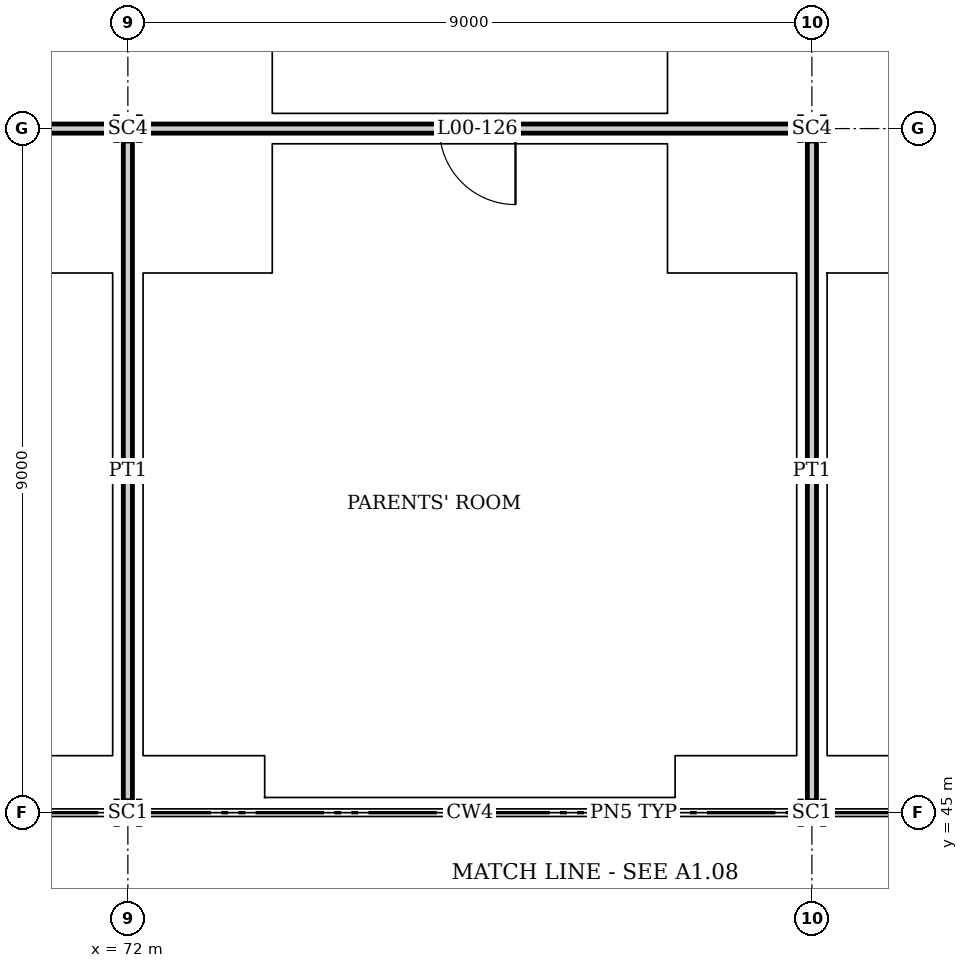
"""IFC4 building model, lengths in metres.
Left out: names, types, materials, properties, quantities, classifications, styles, units other than length and angle.
Written with IfcOpenShell. Run it as: python <this file> out.ifc"""

import sys

from ifc_helpers import new_model, si_unit, direction, frame, frame_2d, origin, origin_2d, place, context, subcontext, project, spatial, rectangle, i_section, extrude, element, fill, save


model = new_model("IFC4")
c1 = context("Model", 3, precision=1e-05, world=origin(), true_north=direction((0.0, 1.0)))
c2 = subcontext(c1, "Body", "Model", "MODEL_VIEW")
j1 = project(units=[si_unit("LENGTHUNIT", "METRE"), si_unit("PLANEANGLEUNIT", "RADIAN")], contexts=[c1])
p1 = place(None, origin())
s1 = spatial("IfcSite", under=j1, at=p1, CompositionType="ELEMENT")
p2 = place(p1, origin())
s2 = spatial("IfcBuilding", under=s1, at=p2, CompositionType="ELEMENT")
p3 = place(p2, origin())
s3 = spatial("IfcBuildingStorey", under=s2, at=p3, CompositionType="ELEMENT", Elevation=0.0)
p4 = place(p3, frame((72.0, 45.0, 0.0), z_axis=(0.0, 0.0, 1.0), x_axis=(0.0, 1.0, 0.0)))
e1 = element("IfcColumn", 1, at=p4, inside=s3, PredefinedType="COLUMN", context=c2, shape_type="SweptSolid", body=[
    extrude(i_section(OverallWidth=0.307, OverallDepth=0.315, WebThickness=0.012, FlangeThickness=0.019, at=origin_2d()), origin(), (0.0, 0.0, 1.0), 6.0),
])
p5 = place(p3, frame((72.0, 54.0, 0.0), z_axis=(0.0, 0.0, 1.0), x_axis=(0.0, 1.0, 0.0)))
e2 = element("IfcColumn", 2, at=p5, inside=s3, PredefinedType="COLUMN", context=c2, shape_type="SweptSolid", body=[
    extrude(i_section(OverallWidth=0.311, OverallDepth=0.327, WebThickness=0.016, FlangeThickness=0.025, at=origin_2d()), origin(), (0.0, 0.0, 1.0), 6.0),
])
p6 = place(p3, frame((81.0, 45.0, 0.0), z_axis=(0.0, 0.0, 1.0), x_axis=(0.0, 1.0, 0.0)))
e3 = element("IfcColumn", 3, at=p6, inside=s3, PredefinedType="COLUMN", context=c2, shape_type="SweptSolid", body=[
    extrude(i_section(OverallWidth=0.307, OverallDepth=0.315, WebThickness=0.012, FlangeThickness=0.019, at=origin_2d()), origin(), (0.0, 0.0, 1.0), 6.0),
])
p7 = place(p3, frame((81.0, 54.0, 0.0), z_axis=(0.0, 0.0, 1.0), x_axis=(0.0, 1.0, 0.0)))
e4 = element("IfcColumn", 4, at=p7, inside=s3, PredefinedType="COLUMN", context=c2, shape_type="SweptSolid", body=[
    extrude(i_section(OverallWidth=0.311, OverallDepth=0.327, WebThickness=0.016, FlangeThickness=0.025, at=origin_2d()), origin(), (0.0, 0.0, 1.0), 6.0),
])
p8 = place(p3, frame((63.0, 54.0, 0.0), z_axis=(0.0, 0.0, 1.0), x_axis=(1.0, 0.0, 0.0)))
e5 = element("IfcWall", 5, at=p8, inside=s3, PredefinedType="PARTITIONING", context=c2, shape_type="SweptSolid", body=[
    extrude(rectangle(XDim=8.836, YDim=0.12, at=frame_2d((4.418, 0.0))), origin(), (0.0, 0.0, 1.0), 5.322),
])
p9 = place(p8, frame((4.1, 0.0, 0.0)))
e6 = element("IfcOpeningElement", 6, at=p9, cuts=e5, PredefinedType="OPENING", context=c2, shape_type="SweptSolid", body=[
    extrude(rectangle(XDim=1.0, YDim=2.1, at=frame_2d((0.5, 1.05))), frame((0.0, 0.07, 0.0), z_axis=(0.0, -1.0, 0.0), x_axis=(1.0, 0.0, 0.0)), (0.0, 0.0, 1.0), 0.14),
])
p10 = place(p3, frame((72.164, 54.0, 0.0), z_axis=(0.0, 0.0, 1.0), x_axis=(1.0, 0.0, 0.0)))
e7 = element("IfcWall", 7, at=p10, inside=s3, PredefinedType="PARTITIONING", context=c2, shape_type="SweptSolid", body=[
    extrude(rectangle(XDim=8.673, YDim=0.12, at=frame_2d((4.336, 0.0))), origin(), (0.0, 0.0, 1.0), 5.322),
])
p11 = place(p10, frame((3.937, 0.0, 0.0)))
e8 = element("IfcOpeningElement", 8, at=p11, cuts=e7, PredefinedType="OPENING", context=c2, shape_type="SweptSolid", body=[
    extrude(rectangle(XDim=1.0, YDim=2.1, at=frame_2d((0.5, 1.05))), frame((0.0, 0.07, 0.0), z_axis=(0.0, -1.0, 0.0), x_axis=(1.0, 0.0, 0.0)), (0.0, 0.0, 1.0), 0.14),
])
for number, where, z_axis, x_axis in (
    (9, (72.0, 45.157, 0.0), (0.0, 0.0, 1.0), (0.0, 1.0, 0.0)),
    (10, (81.0, 45.157, 0.0), (0.0, 0.0, 1.0), (0.0, 1.0, 0.0)),
):
    element("IfcWall", number, at=place(p3, frame(where, z_axis=z_axis, x_axis=x_axis)), inside=s3, PredefinedType="PARTITIONING", context=c2, shape_type="SweptSolid", body=[
        extrude(rectangle(XDim=8.679, YDim=0.12, at=frame_2d((4.339, 0.0))), origin(), (0.0, 0.0, 1.0), 5.447),
    ])
p12 = place(p11, frame((1.0, 0.0, 0.0), z_axis=(0.0, 0.0, 1.0), x_axis=(-1.0, 0.0, 0.0)))
e11 = element("IfcDoor", 11, at=p12, inside=s3, OperationType="SINGLE_SWING_LEFT", PredefinedType="DOOR", context=c2, shape_type="SweptSolid", body=[
    extrude(rectangle(XDim=1.0, YDim=2.1, at=frame_2d((0.5, 1.05))), frame((0.0, 0.025, 0.0), z_axis=(0.0, -1.0, 0.0), x_axis=(1.0, 0.0, 0.0)), (0.0, 0.0, 1.0), 0.05),
])
fill(e8, e11)
save(model, sys.argv[1])
